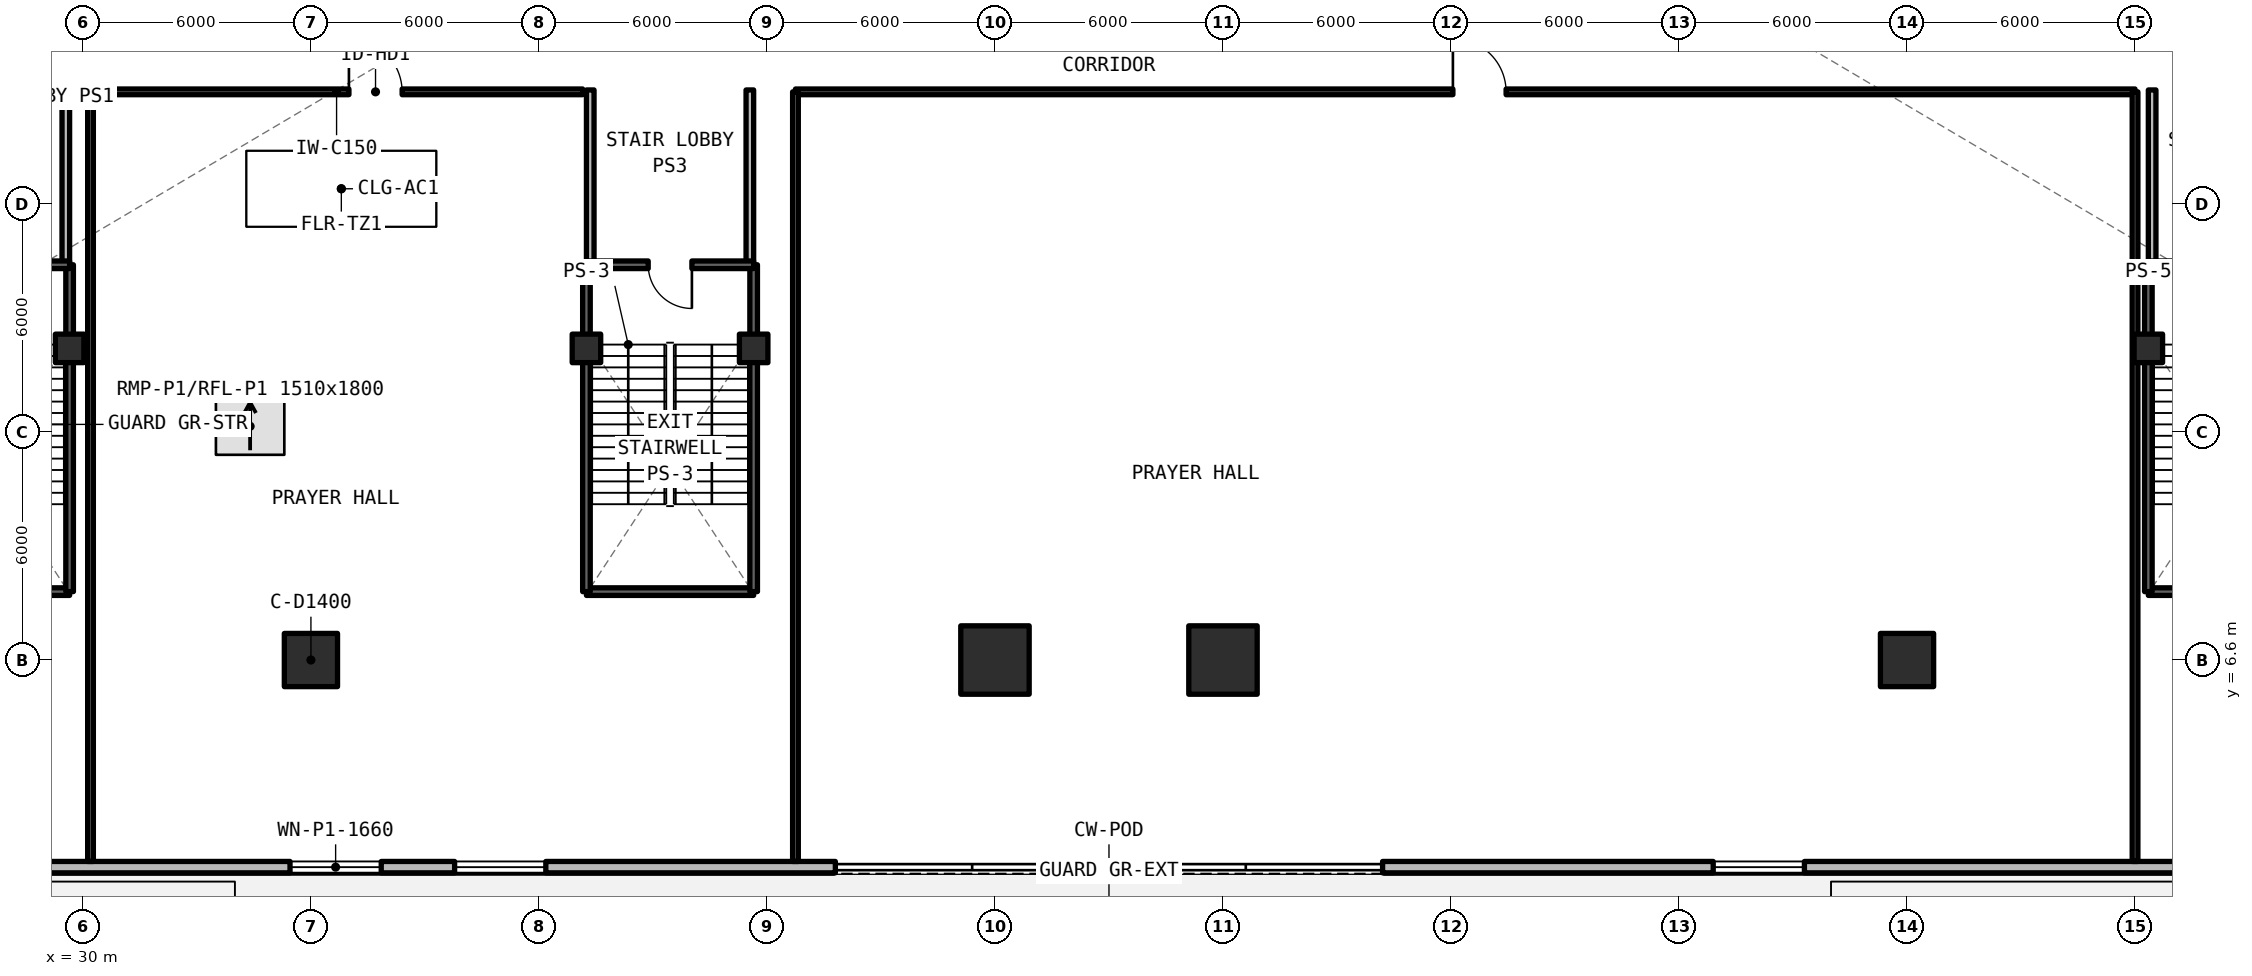
"""IFC4 building model, lengths in metres.
Left out: names, types, materials, properties, quantities, classifications, styles, units other than length and angle.
Written with IfcOpenShell. Run it as: python <this file> out.ifc"""

import sys

from ifc_helpers import new_model, si_unit, direction, frame, frame_2d, origin, origin_2d, place, context, subcontext, project, spatial, rectangle, circle, extrude, element, fill, save


model = new_model("IFC4")
c1 = context("Model", 3, precision=1e-05, world=origin(), true_north=direction((0.0, 1.0)))
c2 = subcontext(c1, "Body", "Model", "MODEL_VIEW")
j1 = project(units=[si_unit("LENGTHUNIT", "METRE"), si_unit("PLANEANGLEUNIT", "RADIAN")], contexts=[c1])
p1 = place(None, origin())
s1 = spatial("IfcSite", under=j1, at=p1, CompositionType="ELEMENT")
p2 = place(p1, origin())
s2 = spatial("IfcBuilding", under=s1, at=p2, CompositionType="ELEMENT")
p3 = place(p2, frame((0.0, 0.0, 4.95)))
s3 = spatial("IfcBuildingStorey", under=s2, at=p3, CompositionType="ELEMENT", Elevation=4.95)
p4 = place(p3, frame((36.0, 6.6, 0.0), z_axis=(0.0, 0.0, 1.0), x_axis=(1.0, 0.0, 0.0)))
e1 = element("IfcColumn", 1, at=p4, inside=s3, PredefinedType="COLUMN", context=c2, shape_type="SweptSolid", body=[
    extrude(circle(Radius=0.7, at=origin_2d()), origin(), (0.0, 0.0, 1.0), 4.95),
])
for number, where, z_axis, x_axis in (
    (2, (54.0, 6.6, 0.0), (0.0, 0.0, 1.0), (1.0, 0.0, 0.0)),
    (3, (60.0, 6.6, 0.0), (0.0, 0.0, 1.0), (1.0, 0.0, 0.0)),
):
    element("IfcColumn", number, at=place(p3, frame(where, z_axis=z_axis, x_axis=x_axis)), inside=s3, PredefinedType="COLUMN", context=c2, shape_type="SweptSolid", body=[
        extrude(rectangle(XDim=1.8, YDim=1.8, at=origin_2d()), origin(), (0.0, 0.0, 1.0), 4.95),
    ])
p5 = place(p3, frame((78.0, 6.6, 0.0), z_axis=(0.0, 0.0, 1.0), x_axis=(1.0, 0.0, 0.0)))
e4 = element("IfcColumn", 4, at=p5, inside=s3, PredefinedType="COLUMN", context=c2, shape_type="SweptSolid", body=[
    extrude(circle(Radius=0.7, at=origin_2d()), origin(), (0.0, 0.0, 1.0), 4.95),
])
for number, where, z_axis, x_axis in (
    (5, (29.65, 14.8, 0.0), (0.0, 0.0, 1.0), (1.0, 0.0, 0.0)),
    (6, (43.25, 14.8, 0.0), (0.0, 0.0, 1.0), (1.0, 0.0, 0.0)),
    (7, (47.65, 14.8, 0.0), (0.0, 0.0, 1.0), (1.0, 0.0, 0.0)),
    (8, (84.35, 14.8, 0.0), (0.0, 0.0, 1.0), (1.0, 0.0, 0.0)),
):
    element("IfcColumn", number, at=place(p3, frame(where, z_axis=z_axis, x_axis=x_axis)), inside=s3, PredefinedType="COLUMN", context=c2, shape_type="SweptSolid", body=[
        extrude(rectangle(XDim=0.75, YDim=0.75, at=origin_2d()), origin(), (0.0, 0.0, 1.0), 4.95),
    ])
p6 = place(p3, frame((3.662, 1.15, 0.0), z_axis=(0.0, 0.0, 1.0), x_axis=(1.0, 0.0, 0.0)))
e9 = element("IfcWall", 9, at=p6, inside=s3, PredefinedType="SOLIDWALL", context=c2, shape_type="SweptSolid", body=[
    extrude(rectangle(XDim=46.138, YDim=0.3, at=frame_2d((23.069, 0.0))), origin(), (0.0, 0.0, 1.0), 4.67),
])
p7 = place(p6, frame((7.75, 0.0, 0.0)))
e10 = element("IfcOpeningElement", 10, at=p7, cuts=e9, PredefinedType="OPENING", context=c2, shape_type="SweptSolid", body=[
    extrude(rectangle(XDim=1.5, YDim=2.2, at=frame_2d((0.75, 1.1))), frame((0.0, 0.16, 0.0), z_axis=(0.0, -1.0, 0.0), x_axis=(1.0, 0.0, 0.0)), (0.0, 0.0, 1.0), 0.32),
])
p8 = place(p6, frame((31.788, 0.0, 0.78)))
e11 = element("IfcOpeningElement", 11, at=p8, cuts=e9, PredefinedType="OPENING", context=c2, shape_type="SweptSolid", body=[
    extrude(rectangle(XDim=2.4, YDim=1.66, at=frame_2d((1.2, 0.83))), frame((0.0, 0.16, 0.0), z_axis=(0.0, -1.0, 0.0), x_axis=(1.0, 0.0, 0.0)), (0.0, 0.0, 1.0), 0.32),
])
p9 = place(p6, frame((1.969, 0.0, 0.78)))
e12 = element("IfcOpeningElement", 12, at=p9, cuts=e9, PredefinedType="OPENING", context=c2, shape_type="SweptSolid", body=[
    extrude(rectangle(XDim=2.4, YDim=1.66, at=frame_2d((1.2, 0.83))), frame((0.0, 0.16, 0.0), z_axis=(0.0, -1.0, 0.0), x_axis=(1.0, 0.0, 0.0)), (0.0, 0.0, 1.0), 0.32),
])
p10 = place(p6, frame((22.538, 0.0, 0.78)))
e13 = element("IfcOpeningElement", 13, at=p10, cuts=e9, PredefinedType="OPENING", context=c2, shape_type="SweptSolid", body=[
    extrude(rectangle(XDim=2.4, YDim=1.66, at=frame_2d((1.2, 0.83))), frame((0.0, 0.16, 0.0), z_axis=(0.0, -1.0, 0.0), x_axis=(1.0, 0.0, 0.0)), (0.0, 0.0, 1.0), 0.32),
])
p11 = place(p6, frame((17.119, 0.0, 0.78)))
e14 = element("IfcOpeningElement", 14, at=p11, cuts=e9, PredefinedType="OPENING", context=c2, shape_type="SweptSolid", body=[
    extrude(rectangle(XDim=2.4, YDim=1.66, at=frame_2d((1.2, 0.83))), frame((0.0, 0.16, 0.0), z_axis=(0.0, -1.0, 0.0), x_axis=(1.0, 0.0, 0.0)), (0.0, 0.0, 1.0), 0.32),
])
p12 = place(p6, frame((36.119, 0.0, 0.78)))
e15 = element("IfcOpeningElement", 15, at=p12, cuts=e9, PredefinedType="OPENING", context=c2, shape_type="SweptSolid", body=[
    extrude(rectangle(XDim=2.4, YDim=1.66, at=frame_2d((1.2, 0.83))), frame((0.0, 0.16, 0.0), z_axis=(0.0, -1.0, 0.0), x_axis=(1.0, 0.0, 0.0)), (0.0, 0.0, 1.0), 0.32),
])
p13 = place(p3, frame((64.2, 1.15, 0.0), z_axis=(0.0, 0.0, 1.0), x_axis=(1.0, 0.0, 0.0)))
e16 = element("IfcWall", 16, at=p13, inside=s3, PredefinedType="SOLIDWALL", context=c2, shape_type="SweptSolid", body=[
    extrude(rectangle(XDim=46.138, YDim=0.3, at=frame_2d((23.069, 0.0))), origin(), (0.0, 0.0, 1.0), 4.67),
])
p14 = place(p13, frame((8.7, 0.0, 0.78)))
e17 = element("IfcOpeningElement", 17, at=p14, cuts=e16, PredefinedType="OPENING", context=c2, shape_type="SweptSolid", body=[
    extrude(rectangle(XDim=2.4, YDim=1.66, at=frame_2d((1.2, 0.83))), frame((0.0, 0.16, 0.0), z_axis=(0.0, -1.0, 0.0), x_axis=(1.0, 0.0, 0.0)), (0.0, 0.0, 1.0), 0.32),
])
p15 = place(p13, frame((30.8, 0.0, 0.78)))
e18 = element("IfcOpeningElement", 18, at=p15, cuts=e16, PredefinedType="OPENING", context=c2, shape_type="SweptSolid", body=[
    extrude(rectangle(XDim=2.4, YDim=1.66, at=frame_2d((1.2, 0.83))), frame((0.0, 0.16, 0.0), z_axis=(0.0, -1.0, 0.0), x_axis=(1.0, 0.0, 0.0)), (0.0, 0.0, 1.0), 0.32),
])
p16 = place(p13, frame((41.544, 0.0, 0.78)))
e19 = element("IfcOpeningElement", 19, at=p16, cuts=e16, PredefinedType="OPENING", context=c2, shape_type="SweptSolid", body=[
    extrude(rectangle(XDim=2.4, YDim=1.66, at=frame_2d((1.2, 0.83))), frame((0.0, 0.16, 0.0), z_axis=(0.0, -1.0, 0.0), x_axis=(1.0, 0.0, 0.0)), (0.0, 0.0, 1.0), 0.32),
])
p17 = place(p13, frame((26.619, 0.0, 0.78)))
e20 = element("IfcOpeningElement", 20, at=p17, cuts=e16, PredefinedType="OPENING", context=c2, shape_type="SweptSolid", body=[
    extrude(rectangle(XDim=2.4, YDim=1.66, at=frame_2d((1.2, 0.83))), frame((0.0, 0.16, 0.0), z_axis=(0.0, -1.0, 0.0), x_axis=(1.0, 0.0, 0.0)), (0.0, 0.0, 1.0), 0.32),
])
p18 = place(p13, frame((36.119, 0.0, 0.78)))
e21 = element("IfcOpeningElement", 21, at=p18, cuts=e16, PredefinedType="OPENING", context=c2, shape_type="SweptSolid", body=[
    extrude(rectangle(XDim=2.4, YDim=1.66, at=frame_2d((1.2, 0.83))), frame((0.0, 0.16, 0.0), z_axis=(0.0, -1.0, 0.0), x_axis=(1.0, 0.0, 0.0)), (0.0, 0.0, 1.0), 0.32),
])
for number, where, z_axis, x_axis in (
    (22, (29.55, 17.0, 0.0), (0.0, 0.0, 1.0), (0.0, 1.0, 0.0)),
    (23, (43.35, 17.0, 0.0), (0.0, 0.0, 1.0), (0.0, 1.0, 0.0)),
    (24, (47.55, 17.0, 0.0), (0.0, 0.0, 1.0), (0.0, 1.0, 0.0)),
    (25, (84.45, 17.0, 0.0), (0.0, 0.0, 1.0), (0.0, 1.0, 0.0)),
):
    element("IfcWall", number, at=place(p3, frame(where, z_axis=z_axis, x_axis=x_axis)), inside=s3, PredefinedType="SOLIDWALL", context=c2, shape_type="SweptSolid", body=[
        extrude(rectangle(XDim=4.6, YDim=0.2, at=frame_2d((2.3, 0.0))), origin(), (0.0, 0.0, 1.0), 3.89),
    ])
p19 = place(p3, frame((30.2, 21.55, 0.0), z_axis=(0.0, 0.0, 1.0), x_axis=(1.0, 0.0, 0.0)))
e26 = element("IfcWall", 26, at=p19, inside=s3, PredefinedType="SOLIDWALL", context=c2, shape_type="SweptSolid", body=[
    extrude(rectangle(XDim=12.95, YDim=0.15, at=frame_2d((6.475, 0.0))), origin(), (0.0, 0.0, 1.0), 3.89),
])
p20 = place(p19, frame((6.8, 0.0, 0.0)))
e27 = element("IfcOpeningElement", 27, at=p20, cuts=e26, PredefinedType="OPENING", context=c2, shape_type="SweptSolid", body=[
    extrude(rectangle(XDim=1.4, YDim=2.15, at=frame_2d((0.7, 1.075))), frame((0.0, 0.085, 0.0), z_axis=(0.0, -1.0, 0.0), x_axis=(1.0, 0.0, 0.0)), (0.0, 0.0, 1.0), 0.17),
])
p21 = place(p3, frame((30.2, 1.3, 0.0), z_axis=(0.0, 0.0, 1.0), x_axis=(0.0, 1.0, 0.0)))
e28 = element("IfcWall", 28, at=p21, inside=s3, PredefinedType="SOLIDWALL", context=c2, shape_type="SweptSolid", body=[
    extrude(rectangle(XDim=20.25, YDim=0.15, at=frame_2d((10.125, 0.0))), origin(), (0.0, 0.0, 1.0), 3.89),
])
p22 = place(p3, frame((48.75, 21.55, 0.0), z_axis=(0.0, 0.0, 1.0), x_axis=(1.0, 0.0, 0.0)))
e29 = element("IfcWall", 29, at=p22, inside=s3, PredefinedType="SOLIDWALL", context=c2, shape_type="SweptSolid", body=[
    extrude(rectangle(XDim=35.25, YDim=0.15, at=frame_2d((17.625, 0.0))), origin(), (0.0, 0.0, 1.0), 3.89),
])
p23 = place(p22, frame((17.3, 0.0, 0.0)))
e30 = element("IfcOpeningElement", 30, at=p23, cuts=e29, PredefinedType="OPENING", context=c2, shape_type="SweptSolid", body=[
    extrude(rectangle(XDim=1.4, YDim=2.15, at=frame_2d((0.7, 1.075))), frame((0.0, 0.085, 0.0), z_axis=(0.0, -1.0, 0.0), x_axis=(1.0, 0.0, 0.0)), (0.0, 0.0, 1.0), 0.17),
])
for number, where, z_axis, x_axis in (
    (31, (48.75, 1.3, 0.0), (0.0, 0.0, 1.0), (0.0, 1.0, 0.0)),
    (32, (84.0, 1.3, 0.0), (0.0, 0.0, 1.0), (0.0, 1.0, 0.0)),
):
    element("IfcWall", number, at=place(p3, frame(where, z_axis=z_axis, x_axis=x_axis)), inside=s3, PredefinedType="SOLIDWALL", context=c2, shape_type="SweptSolid", body=[
        extrude(rectangle(XDim=20.25, YDim=0.15, at=frame_2d((10.125, 0.0))), origin(), (0.0, 0.0, 1.0), 3.89),
    ])
p24 = place(p3, frame((25.25, 8.4, 0.0), z_axis=(0.0, 0.0, 1.0), x_axis=(1.0, 0.0, 0.0)))
e33 = element("IfcWall", 33, at=p24, inside=s3, PredefinedType="SOLIDWALL", context=c2, shape_type="SweptSolid", body=[
    extrude(rectangle(XDim=4.4, YDim=0.2, at=frame_2d((2.2, 0.0))), origin(), (0.0, 0.0, 1.0), 4.95),
])
p25 = place(p3, frame((29.65, 8.4, 0.0), z_axis=(0.0, 0.0, 1.0), x_axis=(0.0, 1.0, 0.0)))
e34 = element("IfcWall", 34, at=p25, inside=s3, PredefinedType="SOLIDWALL", context=c2, shape_type="SweptSolid", body=[
    extrude(rectangle(XDim=8.6, YDim=0.2, at=frame_2d((4.3, 0.0))), origin(), (0.0, 0.0, 1.0), 4.95),
])
p26 = place(p3, frame((29.65, 17.0, 0.0), z_axis=(0.0, 0.0, 1.0), x_axis=(-1.0, 0.0, 0.0)))
e35 = element("IfcWall", 35, at=p26, inside=s3, PredefinedType="SOLIDWALL", context=c2, shape_type="SweptSolid", body=[
    extrude(rectangle(XDim=4.4, YDim=0.2, at=frame_2d((2.2, 0.0))), origin(), (0.0, 0.0, 1.0), 4.95),
])
p27 = place(p26, frame((1.625, 0.0, 0.0)))
e36 = element("IfcOpeningElement", 36, at=p27, cuts=e35, PredefinedType="OPENING", context=c2, shape_type="SweptSolid", body=[
    extrude(rectangle(XDim=1.15, YDim=2.15, at=frame_2d((0.575, 1.075))), frame((0.0, 0.11, 0.0), z_axis=(0.0, -1.0, 0.0), x_axis=(1.0, 0.0, 0.0)), (0.0, 0.0, 1.0), 0.22),
])
p28 = place(p3, frame((43.25, 8.4, 0.0), z_axis=(0.0, 0.0, 1.0), x_axis=(1.0, 0.0, 0.0)))
e37 = element("IfcWall", 37, at=p28, inside=s3, PredefinedType="SOLIDWALL", context=c2, shape_type="SweptSolid", body=[
    extrude(rectangle(XDim=4.4, YDim=0.2, at=frame_2d((2.2, 0.0))), origin(), (0.0, 0.0, 1.0), 4.95),
])
p29 = place(p3, frame((47.65, 8.4, 0.0), z_axis=(0.0, 0.0, 1.0), x_axis=(0.0, 1.0, 0.0)))
e38 = element("IfcWall", 38, at=p29, inside=s3, PredefinedType="SOLIDWALL", context=c2, shape_type="SweptSolid", body=[
    extrude(rectangle(XDim=8.6, YDim=0.2, at=frame_2d((4.3, 0.0))), origin(), (0.0, 0.0, 1.0), 4.95),
])
p30 = place(p3, frame((47.65, 17.0, 0.0), z_axis=(0.0, 0.0, 1.0), x_axis=(-1.0, 0.0, 0.0)))
e39 = element("IfcWall", 39, at=p30, inside=s3, PredefinedType="SOLIDWALL", context=c2, shape_type="SweptSolid", body=[
    extrude(rectangle(XDim=4.4, YDim=0.2, at=frame_2d((2.2, 0.0))), origin(), (0.0, 0.0, 1.0), 4.95),
])
p31 = place(p30, frame((1.625, 0.0, 0.0)))
e40 = element("IfcOpeningElement", 40, at=p31, cuts=e39, PredefinedType="OPENING", context=c2, shape_type="SweptSolid", body=[
    extrude(rectangle(XDim=1.15, YDim=2.15, at=frame_2d((0.575, 1.075))), frame((0.0, 0.11, 0.0), z_axis=(0.0, -1.0, 0.0), x_axis=(1.0, 0.0, 0.0)), (0.0, 0.0, 1.0), 0.22),
])
p32 = place(p3, frame((43.25, 17.0, 0.0), z_axis=(0.0, 0.0, 1.0), x_axis=(0.0, -1.0, 0.0)))
e41 = element("IfcWall", 41, at=p32, inside=s3, PredefinedType="SOLIDWALL", context=c2, shape_type="SweptSolid", body=[
    extrude(rectangle(XDim=8.6, YDim=0.2, at=frame_2d((4.3, 0.0))), origin(), (0.0, 0.0, 1.0), 4.95),
])
p33 = place(p3, frame((84.35, 8.4, 0.0), z_axis=(0.0, 0.0, 1.0), x_axis=(1.0, 0.0, 0.0)))
e42 = element("IfcWall", 42, at=p33, inside=s3, PredefinedType="SOLIDWALL", context=c2, shape_type="SweptSolid", body=[
    extrude(rectangle(XDim=4.4, YDim=0.2, at=frame_2d((2.2, 0.0))), origin(), (0.0, 0.0, 1.0), 4.95),
])
p34 = place(p3, frame((88.75, 17.0, 0.0), z_axis=(0.0, 0.0, 1.0), x_axis=(-1.0, 0.0, 0.0)))
e43 = element("IfcWall", 43, at=p34, inside=s3, PredefinedType="SOLIDWALL", context=c2, shape_type="SweptSolid", body=[
    extrude(rectangle(XDim=4.4, YDim=0.2, at=frame_2d((2.2, 0.0))), origin(), (0.0, 0.0, 1.0), 4.95),
])
p35 = place(p34, frame((1.625, 0.0, 0.0)))
e44 = element("IfcOpeningElement", 44, at=p35, cuts=e43, PredefinedType="OPENING", context=c2, shape_type="SweptSolid", body=[
    extrude(rectangle(XDim=1.15, YDim=2.15, at=frame_2d((0.575, 1.075))), frame((0.0, 0.11, 0.0), z_axis=(0.0, -1.0, 0.0), x_axis=(1.0, 0.0, 0.0)), (0.0, 0.0, 1.0), 0.22),
])
p36 = place(p3, frame((84.35, 17.0, 0.0), z_axis=(0.0, 0.0, 1.0), x_axis=(0.0, -1.0, 0.0)))
e45 = element("IfcWall", 45, at=p36, inside=s3, PredefinedType="SOLIDWALL", context=c2, shape_type="SweptSolid", body=[
    extrude(rectangle(XDim=8.6, YDim=0.2, at=frame_2d((4.3, 0.0))), origin(), (0.0, 0.0, 1.0), 4.95),
])
p37 = place(p8, origin())
e46 = element("IfcWindow", 46, at=p37, inside=s3, PartitioningType="SINGLE_PANEL", PredefinedType="WINDOW", context=c2, shape_type="SweptSolid", body=[
    extrude(rectangle(XDim=2.4, YDim=1.66, at=frame_2d((1.2, 0.83))), frame((0.0, 0.03, 0.0), z_axis=(0.0, -1.0, 0.0), x_axis=(1.0, 0.0, 0.0)), (0.0, 0.0, 1.0), 0.06),
])
fill(e11, e46)
p38 = place(p12, origin())
e47 = element("IfcWindow", 47, at=p38, inside=s3, PartitioningType="SINGLE_PANEL", PredefinedType="WINDOW", context=c2, shape_type="SweptSolid", body=[
    extrude(rectangle(XDim=2.4, YDim=1.66, at=frame_2d((1.2, 0.83))), frame((0.0, 0.03, 0.0), z_axis=(0.0, -1.0, 0.0), x_axis=(1.0, 0.0, 0.0)), (0.0, 0.0, 1.0), 0.06),
])
fill(e15, e47)
p39 = place(p14, origin())
e48 = element("IfcWindow", 48, at=p39, inside=s3, PartitioningType="SINGLE_PANEL", PredefinedType="WINDOW", context=c2, shape_type="SweptSolid", body=[
    extrude(rectangle(XDim=2.4, YDim=1.66, at=frame_2d((1.2, 0.83))), frame((0.0, 0.03, 0.0), z_axis=(0.0, -1.0, 0.0), x_axis=(1.0, 0.0, 0.0)), (0.0, 0.0, 1.0), 0.06),
])
fill(e17, e48)
p40 = place(p20, origin())
e49 = element("IfcDoor", 49, at=p40, inside=s3, OperationType="SINGLE_SWING_LEFT", PredefinedType="DOOR", context=c2, shape_type="SweptSolid", body=[
    extrude(rectangle(XDim=1.4, YDim=2.15, at=frame_2d((0.7, 1.075))), frame((0.0, 0.025, 0.0), z_axis=(0.0, -1.0, 0.0), x_axis=(1.0, 0.0, 0.0)), (0.0, 0.0, 1.0), 0.05),
])
fill(e27, e49)
p41 = place(p23, origin())
e50 = element("IfcDoor", 50, at=p41, inside=s3, OperationType="SINGLE_SWING_RIGHT", PredefinedType="DOOR", context=c2, shape_type="SweptSolid", body=[
    extrude(rectangle(XDim=1.4, YDim=2.15, at=frame_2d((0.7, 1.075))), frame((0.0, 0.025, 0.0), z_axis=(0.0, -1.0, 0.0), x_axis=(1.0, 0.0, 0.0)), (0.0, 0.0, 1.0), 0.05),
])
fill(e30, e50)
p42 = place(p31, origin())
e51 = element("IfcDoor", 51, at=p42, inside=s3, OperationType="SINGLE_SWING_RIGHT", PredefinedType="DOOR", context=c2, shape_type="SweptSolid", body=[
    extrude(rectangle(XDim=1.15, YDim=2.15, at=frame_2d((0.575, 1.075))), frame((0.0, 0.025, 0.0), z_axis=(0.0, -1.0, 0.0), x_axis=(1.0, 0.0, 0.0)), (0.0, 0.0, 1.0), 0.05),
])
fill(e40, e51)
save(model, sys.argv[1])
